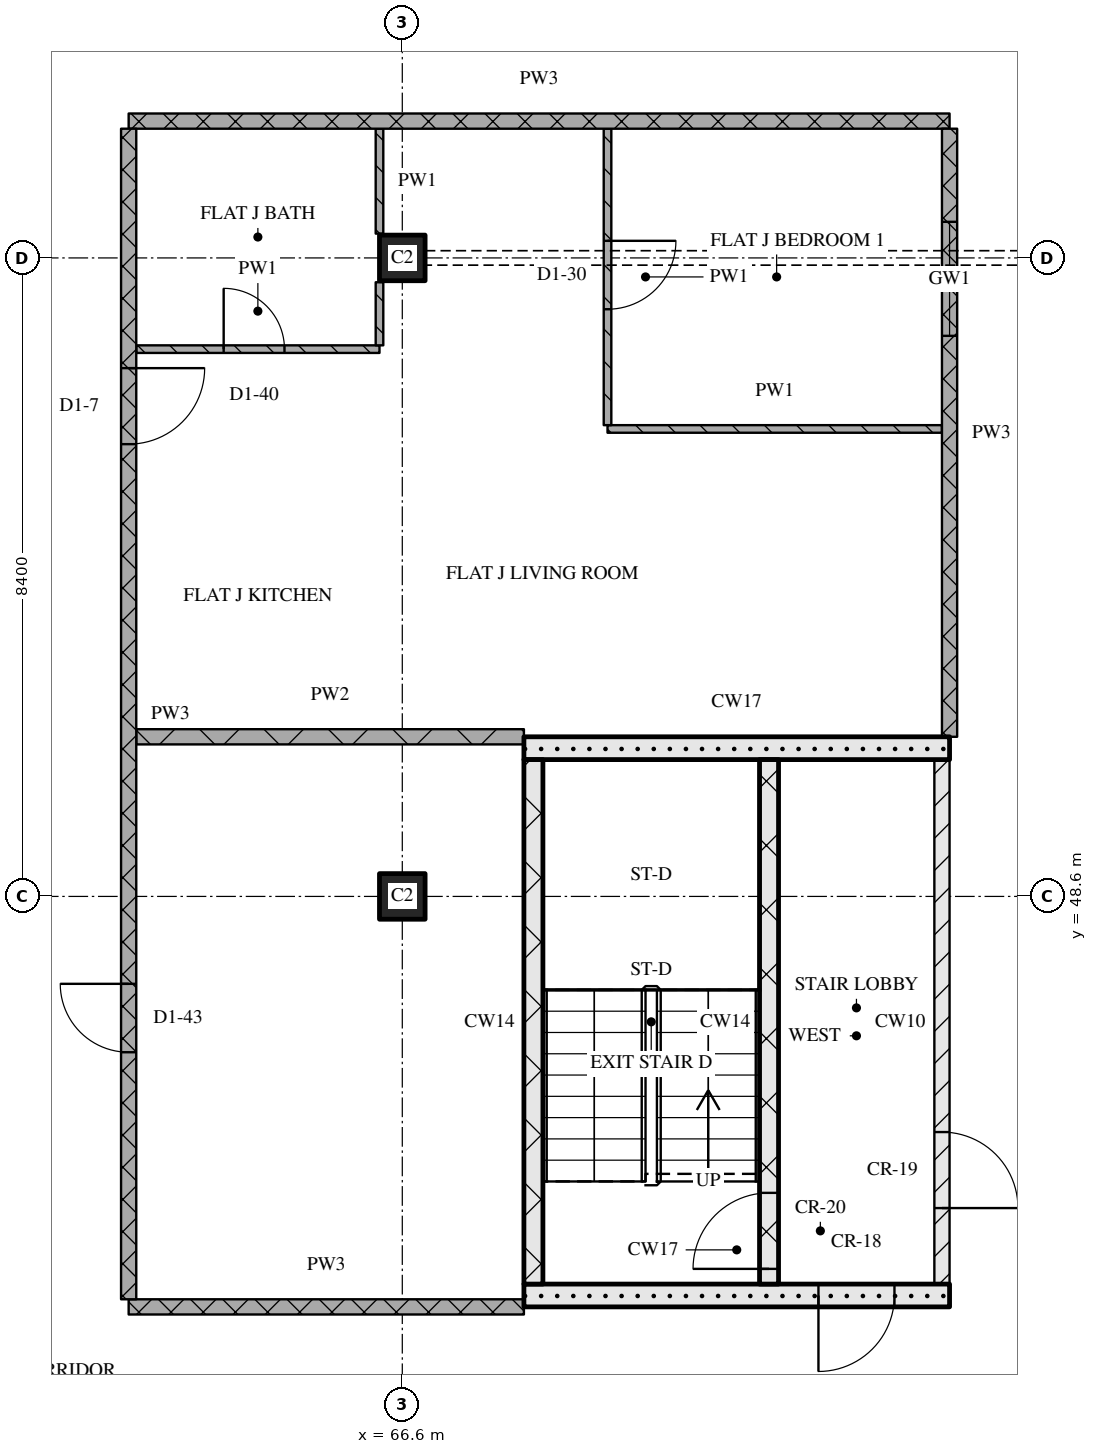
"""IFC4 building model, lengths in metres.
Left out: names, types, materials, properties, quantities, classifications, styles, units other than length and angle.
Written with IfcOpenShell. Run it as: python <this file> out.ifc"""

import sys

from ifc_helpers import new_model, si_unit, direction, frame, frame_2d, origin, origin_2d, place, context, subcontext, project, spatial, rectangle, extrude, element, fill, save


model = new_model("IFC4")
c1 = context("Model", 3, precision=1e-05, world=origin(), true_north=direction((0.0, 1.0)))
c2 = subcontext(c1, "Body", "Model", "MODEL_VIEW")
j1 = project(units=[si_unit("LENGTHUNIT", "METRE"), si_unit("PLANEANGLEUNIT", "RADIAN")], contexts=[c1])
p1 = place(None, origin())
s1 = spatial("IfcSite", under=j1, at=p1, CompositionType="ELEMENT")
p2 = place(p1, origin())
s2 = spatial("IfcBuilding", under=s1, at=p2, CompositionType="ELEMENT")
p3 = place(p2, frame((0.0, 0.0, 209.1)))
s3 = spatial("IfcBuildingStorey", under=s2, at=p3, CompositionType="ELEMENT", Elevation=209.1)
for number, where, z_axis, x_axis in (
    (1, (66.6, 48.6, 0.0), (0.0, 0.0, 1.0), (1.0, 0.0, 0.0)),
    (2, (66.6, 57.0, 0.0), (0.0, 0.0, 1.0), (1.0, 0.0, 0.0)),
):
    element("IfcColumn", number, at=place(p3, frame(where, z_axis=z_axis, x_axis=x_axis)), inside=s3, PredefinedType="COLUMN", context=c2, shape_type="SweptSolid", body=[
        extrude(rectangle(XDim=0.6, YDim=0.6, at=origin_2d()), origin(), (0.0, 0.0, 1.0), 3.6),
    ])
p4 = place(p3, frame((68.2, 43.35, 0.0), z_axis=(0.0, 0.0, 1.0), x_axis=(1.0, 0.0, 0.0)))
e3 = element("IfcWall", 3, at=p4, inside=s3, PredefinedType="SOLIDWALL", context=c2, shape_type="SweptSolid", body=[
    extrude(rectangle(XDim=5.6, YDim=0.3, at=frame_2d((2.8, 0.0))), origin(), (0.0, 0.0, 1.0), 3.32),
])
p5 = place(p4, frame((3.875, 0.0, 0.0)))
e4 = element("IfcOpeningElement", 4, at=p5, cuts=e3, PredefinedType="OPENING", context=c2, shape_type="SweptSolid", body=[
    extrude(rectangle(XDim=1.0, YDim=2.1, at=frame_2d((0.5, 1.05))), frame((0.0, 0.16, 0.0), z_axis=(0.0, -1.0, 0.0), x_axis=(1.0, 0.0, 0.0)), (0.0, 0.0, 1.0), 0.32),
])
p6 = place(p3, frame((68.325, 43.5, 0.0), z_axis=(0.0, 0.0, 1.0), x_axis=(0.0, 1.0, 0.0)))
e5 = element("IfcWall", 5, at=p6, inside=s3, PredefinedType="SOLIDWALL", context=c2, shape_type="SweptSolid", body=[
    extrude(rectangle(XDim=6.9, YDim=0.25, at=frame_2d((3.45, 0.0))), origin(), (0.0, 0.0, 1.0), 3.32),
])
p7 = place(p3, frame((71.425, 43.5, 0.0), z_axis=(0.0, 0.0, 1.0), x_axis=(0.0, 1.0, 0.0)))
e6 = element("IfcWall", 6, at=p7, inside=s3, PredefinedType="SOLIDWALL", context=c2, shape_type="SweptSolid", body=[
    extrude(rectangle(XDim=6.9, YDim=0.25, at=frame_2d((3.45, 0.0))), origin(), (0.0, 0.0, 1.0), 3.32),
])
p8 = place(p7, frame((0.2, 0.0, 0.0)))
e7 = element("IfcOpeningElement", 7, at=p8, cuts=e6, PredefinedType="OPENING", context=c2, shape_type="SweptSolid", body=[
    extrude(rectangle(XDim=1.0, YDim=2.1, at=frame_2d((0.5, 1.05))), frame((0.0, 0.135, 0.0), z_axis=(0.0, -1.0, 0.0), x_axis=(1.0, 0.0, 0.0)), (0.0, 0.0, 1.0), 0.27),
])
p9 = place(p3, frame((73.7, 43.5, 0.0), z_axis=(0.0, 0.0, 1.0), x_axis=(0.0, 1.0, 0.0)))
e8 = element("IfcWall", 8, at=p9, inside=s3, PredefinedType="PARTITIONING", context=c2, shape_type="SweptSolid", body=[
    extrude(rectangle(XDim=6.9, YDim=0.2, at=frame_2d((3.45, 0.0))), origin(), (0.0, 0.0, 1.0), 3.32),
])
p10 = place(p9, frame((1.0, 0.0, 0.0)))
e9 = element("IfcOpeningElement", 9, at=p10, cuts=e8, PredefinedType="OPENING", context=c2, shape_type="SweptSolid", body=[
    extrude(rectangle(XDim=1.0, YDim=2.1, at=frame_2d((0.5, 1.05))), frame((0.0, 0.11, 0.0), z_axis=(0.0, -1.0, 0.0), x_axis=(1.0, 0.0, 0.0)), (0.0, 0.0, 1.0), 0.22),
])
p11 = place(p3, frame((68.2, 50.55, 0.0), z_axis=(0.0, 0.0, 1.0), x_axis=(1.0, 0.0, 0.0)))
e10 = element("IfcWall", 10, at=p11, inside=s3, PredefinedType="SOLIDWALL", context=c2, shape_type="SweptSolid", body=[
    extrude(rectangle(XDim=5.6, YDim=0.3, at=frame_2d((2.8, 0.0))), origin(), (0.0, 0.0, 1.0), 3.32),
])
p12 = place(p3, frame((63.0, 43.2, 0.0), z_axis=(0.0, 0.0, 1.0), x_axis=(1.0, 0.0, 0.0)))
e11 = element("IfcWall", 11, at=p12, inside=s3, PredefinedType="PARTITIONING", context=c2, shape_type="SweptSolid", body=[
    extrude(rectangle(XDim=5.2, YDim=0.2, at=frame_2d((2.6, 0.0))), origin(), (0.0, 0.0, 1.0), 3.32),
])
p13 = place(p3, frame((63.1, 50.7, 0.0), z_axis=(0.0, 0.0, 1.0), x_axis=(1.0, 0.0, 0.0)))
e12 = element("IfcWall", 12, at=p13, inside=s3, PredefinedType="PARTITIONING", context=c2, shape_type="SweptSolid", body=[
    extrude(rectangle(XDim=5.1, YDim=0.2, at=frame_2d((2.55, 0.0))), origin(), (0.0, 0.0, 1.0), 3.32),
])
p14 = place(p3, frame((69.3, 54.75, 0.0), z_axis=(0.0, 0.0, 1.0), x_axis=(1.0, 0.0, 0.0)))
e13 = element("IfcWall", 13, at=p14, inside=s3, PredefinedType="PARTITIONING", context=c2, shape_type="SweptSolid", body=[
    extrude(rectangle(XDim=4.4, YDim=0.1, at=frame_2d((2.2, 0.0))), origin(), (0.0, 0.0, 1.0), 3.32),
])
p15 = place(p3, frame((63.1, 55.8, 0.0), z_axis=(0.0, 0.0, 1.0), x_axis=(1.0, 0.0, 0.0)))
e14 = element("IfcWall", 14, at=p15, inside=s3, PredefinedType="PARTITIONING", context=c2, shape_type="SweptSolid", body=[
    extrude(rectangle(XDim=3.2, YDim=0.1, at=frame_2d((1.6, 0.0))), origin(), (0.0, 0.0, 1.0), 3.32),
])
p16 = place(p15, frame((1.15, 0.0, 0.0)))
e15 = element("IfcOpeningElement", 15, at=p16, cuts=e14, PredefinedType="OPENING", context=c2, shape_type="SweptSolid", body=[
    extrude(rectangle(XDim=0.8, YDim=2.1, at=frame_2d((0.4, 1.05))), frame((0.0, 0.06, 0.0), z_axis=(0.0, -1.0, 0.0), x_axis=(1.0, 0.0, 0.0)), (0.0, 0.0, 1.0), 0.12),
])
p17 = place(p3, frame((63.0, 58.8, 0.0), z_axis=(0.0, 0.0, 1.0), x_axis=(1.0, 0.0, 0.0)))
e16 = element("IfcWall", 16, at=p17, inside=s3, PredefinedType="PARTITIONING", context=c2, shape_type="SweptSolid", body=[
    extrude(rectangle(XDim=10.8, YDim=0.2, at=frame_2d((5.4, 0.0))), origin(), (0.0, 0.0, 1.0), 3.32),
])
p18 = place(p3, frame((63.0, 58.7, 0.0), z_axis=(0.0, 0.0, 1.0), x_axis=(0.0, -1.0, 0.0)))
e17 = element("IfcWall", 17, at=p18, inside=s3, PredefinedType="PARTITIONING", context=c2, shape_type="SweptSolid", body=[
    extrude(rectangle(XDim=15.4, YDim=0.2, at=frame_2d((7.7, 0.0))), origin(), (0.0, 0.0, 1.0), 3.32),
])
p19 = place(p18, frame((3.15, 0.0, 0.0)))
e18 = element("IfcOpeningElement", 18, at=p19, cuts=e17, PredefinedType="OPENING", context=c2, shape_type="SweptSolid", body=[
    extrude(rectangle(XDim=1.0, YDim=2.1, at=frame_2d((0.5, 1.05))), frame((0.0, 0.11, 0.0), z_axis=(0.0, -1.0, 0.0), x_axis=(1.0, 0.0, 0.0)), (0.0, 0.0, 1.0), 0.22),
])
p20 = place(p18, frame((11.25, 0.0, 0.0)))
e19 = element("IfcOpeningElement", 19, at=p20, cuts=e17, PredefinedType="OPENING", context=c2, shape_type="SweptSolid", body=[
    extrude(rectangle(XDim=0.9, YDim=2.1, at=frame_2d((0.45, 1.05))), frame((0.0, 0.11, 0.0), z_axis=(0.0, -1.0, 0.0), x_axis=(1.0, 0.0, 0.0)), (0.0, 0.0, 1.0), 0.22),
])
p21 = place(p3, frame((66.3, 56.68, 0.0), z_axis=(0.0, 0.0, 1.0), x_axis=(0.0, -1.0, 0.0)))
e20 = element("IfcWall", 20, at=p21, inside=s3, PredefinedType="PARTITIONING", context=c2, shape_type="SweptSolid", body=[
    extrude(rectangle(XDim=0.83, YDim=0.1, at=frame_2d((0.415, 0.0))), origin(), (0.0, 0.0, 1.0), 3.32),
])
p22 = place(p3, frame((66.3, 58.7, 0.0), z_axis=(0.0, 0.0, 1.0), x_axis=(0.0, -1.0, 0.0)))
e21 = element("IfcWall", 21, at=p22, inside=s3, PredefinedType="PARTITIONING", context=c2, shape_type="SweptSolid", body=[
    extrude(rectangle(XDim=1.38, YDim=0.1, at=frame_2d((0.69, 0.0))), origin(), (0.0, 0.0, 1.0), 3.32),
])
p23 = place(p3, frame((69.3, 58.7, 0.0), z_axis=(0.0, 0.0, 1.0), x_axis=(0.0, -1.0, 0.0)))
e22 = element("IfcWall", 22, at=p23, inside=s3, PredefinedType="PARTITIONING", context=c2, shape_type="SweptSolid", body=[
    extrude(rectangle(XDim=3.9, YDim=0.1, at=frame_2d((1.95, 0.0))), origin(), (0.0, 0.0, 1.0), 3.32),
])
p24 = place(p23, frame((1.475, 0.0, 0.0)))
e23 = element("IfcOpeningElement", 23, at=p24, cuts=e22, PredefinedType="OPENING", context=c2, shape_type="SweptSolid", body=[
    extrude(rectangle(XDim=0.9, YDim=2.1, at=frame_2d((0.45, 1.05))), frame((0.0, 0.06, 0.0), z_axis=(0.0, -1.0, 0.0), x_axis=(1.0, 0.0, 0.0)), (0.0, 0.0, 1.0), 0.12),
])
p25 = place(p3, frame((73.8, 58.7, 0.0), z_axis=(0.0, 0.0, 1.0), x_axis=(0.0, -1.0, 0.0)))
e24 = element("IfcWall", 24, at=p25, inside=s3, PredefinedType="PARTITIONING", context=c2, shape_type="SweptSolid", body=[
    extrude(rectangle(XDim=8.0, YDim=0.2, at=frame_2d((4.0, 0.0))), origin(), (0.0, 0.0, 1.0), 3.32),
])
p26 = place(p25, frame((1.225, 0.0, 0.9)))
e25 = element("IfcOpeningElement", 25, at=p26, cuts=e24, PredefinedType="OPENING", context=c2, shape_type="SweptSolid", body=[
    extrude(rectangle(XDim=1.5, YDim=1.5, at=frame_2d((0.75, 0.75))), frame((0.0, 0.11, 0.0), z_axis=(0.0, -1.0, 0.0), x_axis=(1.0, 0.0, 0.0)), (0.0, 0.0, 1.0), 0.22),
])
p27 = place(p5, origin())
e26 = element("IfcDoor", 26, at=p27, inside=s3, OperationType="SINGLE_SWING_RIGHT", PredefinedType="DOOR", context=c2, shape_type="SweptSolid", body=[
    extrude(rectangle(XDim=1.0, YDim=2.1, at=frame_2d((0.5, 1.05))), frame((0.0, 0.025, 0.0), z_axis=(0.0, -1.0, 0.0), x_axis=(1.0, 0.0, 0.0)), (0.0, 0.0, 1.0), 0.05),
])
fill(e4, e26)
p28 = place(p8, origin())
e27 = element("IfcDoor", 27, at=p28, inside=s3, OperationType="SINGLE_SWING_LEFT", PredefinedType="DOOR", context=c2, shape_type="SweptSolid", body=[
    extrude(rectangle(XDim=1.0, YDim=2.1, at=frame_2d((0.5, 1.05))), frame((0.0, 0.025, 0.0), z_axis=(0.0, -1.0, 0.0), x_axis=(1.0, 0.0, 0.0)), (0.0, 0.0, 1.0), 0.05),
])
fill(e7, e27)
p29 = place(p10, origin())
e28 = element("IfcDoor", 28, at=p29, inside=s3, OperationType="SINGLE_SWING_RIGHT", PredefinedType="DOOR", context=c2, shape_type="SweptSolid", body=[
    extrude(rectangle(XDim=1.0, YDim=2.1, at=frame_2d((0.5, 1.05))), frame((0.0, 0.025, 0.0), z_axis=(0.0, -1.0, 0.0), x_axis=(1.0, 0.0, 0.0)), (0.0, 0.0, 1.0), 0.05),
])
fill(e9, e28)
p30 = place(p16, origin())
e29 = element("IfcDoor", 29, at=p30, inside=s3, OperationType="SINGLE_SWING_LEFT", PredefinedType="DOOR", context=c2, shape_type="SweptSolid", body=[
    extrude(rectangle(XDim=0.8, YDim=2.1, at=frame_2d((0.4, 1.05))), frame((0.0, 0.025, 0.0), z_axis=(0.0, -1.0, 0.0), x_axis=(1.0, 0.0, 0.0)), (0.0, 0.0, 1.0), 0.05),
])
fill(e15, e29)
p31 = place(p19, origin())
e30 = element("IfcDoor", 30, at=p31, inside=s3, OperationType="SINGLE_SWING_LEFT", PredefinedType="DOOR", context=c2, shape_type="SweptSolid", body=[
    extrude(rectangle(XDim=1.0, YDim=2.1, at=frame_2d((0.5, 1.05))), frame((0.0, 0.025, 0.0), z_axis=(0.0, -1.0, 0.0), x_axis=(1.0, 0.0, 0.0)), (0.0, 0.0, 1.0), 0.05),
])
fill(e18, e30)
p32 = place(p20, origin())
e31 = element("IfcDoor", 31, at=p32, inside=s3, OperationType="SINGLE_SWING_RIGHT", PredefinedType="DOOR", context=c2, shape_type="SweptSolid", body=[
    extrude(rectangle(XDim=0.9, YDim=2.1, at=frame_2d((0.45, 1.05))), frame((0.0, 0.025, 0.0), z_axis=(0.0, -1.0, 0.0), x_axis=(1.0, 0.0, 0.0)), (0.0, 0.0, 1.0), 0.05),
])
fill(e19, e31)
p33 = place(p24, origin())
e32 = element("IfcDoor", 32, at=p33, inside=s3, OperationType="SINGLE_SWING_LEFT", PredefinedType="DOOR", context=c2, shape_type="SweptSolid", body=[
    extrude(rectangle(XDim=0.9, YDim=2.1, at=frame_2d((0.45, 1.05))), frame((0.0, 0.025, 0.0), z_axis=(0.0, -1.0, 0.0), x_axis=(1.0, 0.0, 0.0)), (0.0, 0.0, 1.0), 0.05),
])
fill(e23, e32)
p34 = place(p26, origin())
e33 = element("IfcWindow", 33, at=p34, inside=s3, PartitioningType="SINGLE_PANEL", PredefinedType="WINDOW", context=c2, shape_type="SweptSolid", body=[
    extrude(rectangle(XDim=1.5, YDim=1.5, at=frame_2d((0.75, 0.75))), frame((0.0, 0.03, 0.0), z_axis=(0.0, -1.0, 0.0), x_axis=(1.0, 0.0, 0.0)), (0.0, 0.0, 1.0), 0.06),
])
fill(e25, e33)
save(model, sys.argv[1])
